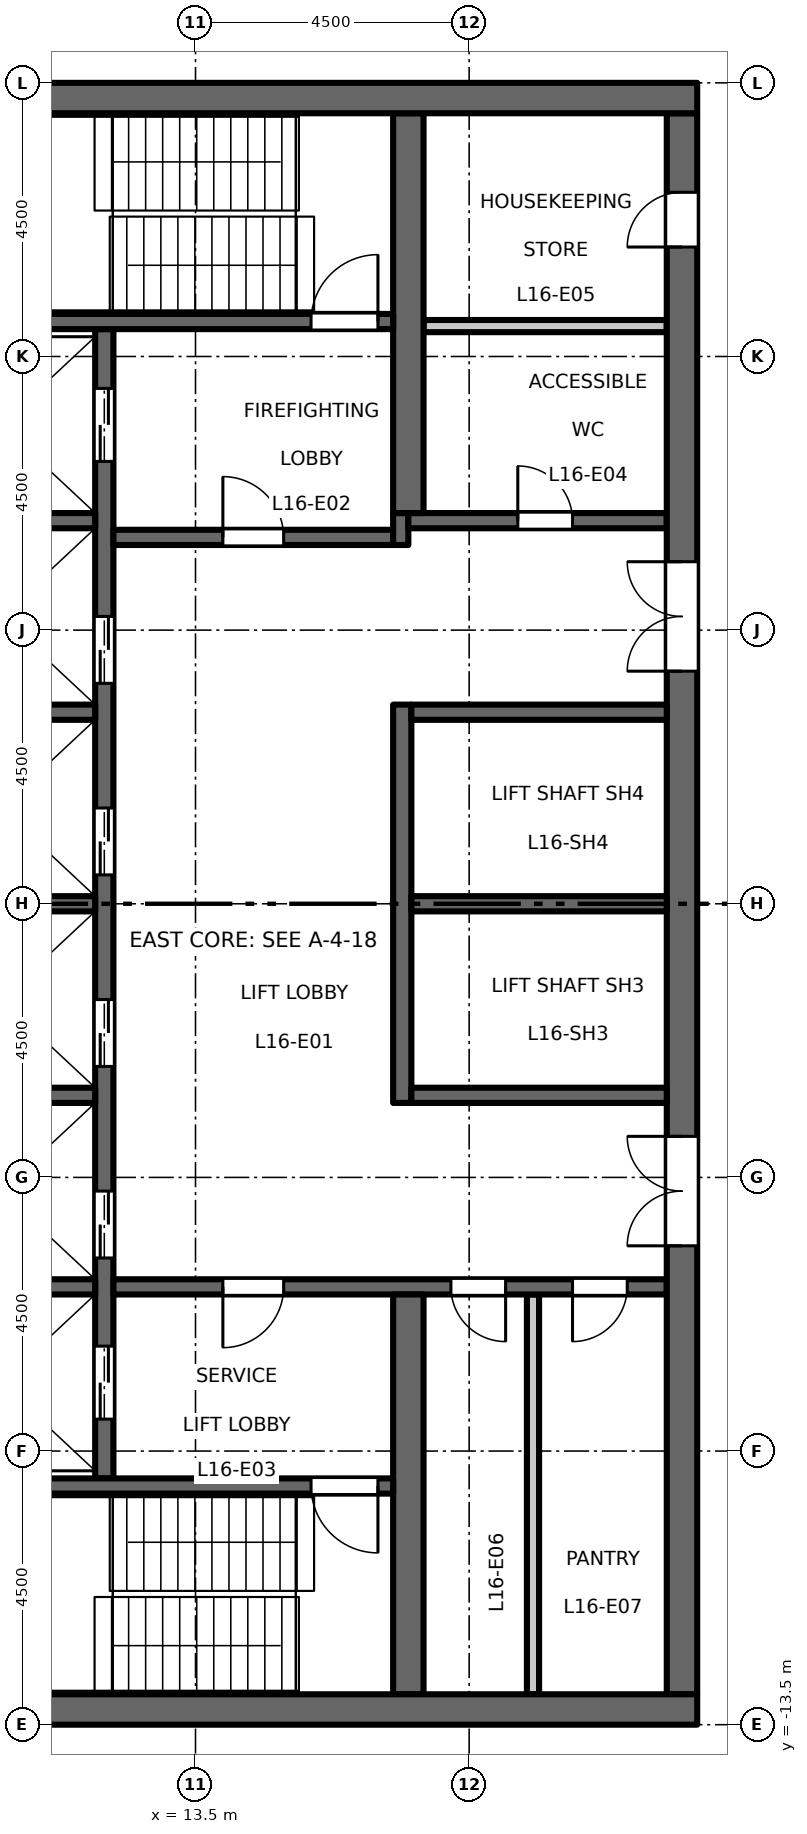
"""IFC4 building model, lengths in metres.
Left out: names, types, materials, properties, quantities, classifications, styles, units other than length and angle.
Written with IfcOpenShell. Run it as: python <this file> out.ifc"""

import sys

from ifc_helpers import new_model, si_unit, direction, frame, frame_2d, origin, place, context, subcontext, project, spatial, rectangle, extrude, element, fill, save


model = new_model("IFC4")
c1 = context("Model", 3, precision=1e-05, world=origin(), true_north=direction((0.0, 1.0)))
c2 = subcontext(c1, "Body", "Model", "MODEL_VIEW")
j1 = project(units=[si_unit("LENGTHUNIT", "METRE"), si_unit("PLANEANGLEUNIT", "RADIAN")], contexts=[c1])
p1 = place(None, origin())
s1 = spatial("IfcSite", under=j1, at=p1, CompositionType="ELEMENT")
p2 = place(p1, origin())
s2 = spatial("IfcBuilding", under=s1, at=p2, CompositionType="ELEMENT")
p3 = place(p2, frame((0.0, 0.0, 76.2)))
s3 = spatial("IfcBuildingStorey", under=s2, at=p3, CompositionType="ELEMENT", Elevation=76.2)
p4 = place(p3, frame((12.0, -9.45, 0.0), z_axis=(0.0, 0.0, 1.0), x_axis=(0.0, 1.0, 0.0)))
e1 = element("IfcWall", 1, at=p4, inside=s3, PredefinedType="SHEAR", context=c2, shape_type="SweptSolid", body=[
    extrude(rectangle(XDim=18.9, YDim=0.3, at=frame_2d((9.45, 0.0))), origin(), (0.0, 0.0, 1.0), 4.35),
])
p5 = place(p4, frame((3.625, 0.0, 0.0)))
e2 = element("IfcOpeningElement", 2, at=p5, cuts=e1, PredefinedType="OPENING", context=c2, shape_type="SweptSolid", body=[
    extrude(rectangle(XDim=1.1, YDim=2.1, at=frame_2d((0.55, 1.05))), frame((0.0, 0.16, 0.0), z_axis=(0.0, -1.0, 0.0), x_axis=(1.0, 0.0, 0.0)), (0.0, 0.0, 1.0), 0.32),
])
p6 = place(p4, frame((6.775, 0.0, 0.0)))
e3 = element("IfcOpeningElement", 3, at=p6, cuts=e1, PredefinedType="OPENING", context=c2, shape_type="SweptSolid", body=[
    extrude(rectangle(XDim=1.1, YDim=2.1, at=frame_2d((0.55, 1.05))), frame((0.0, 0.16, 0.0), z_axis=(0.0, -1.0, 0.0), x_axis=(1.0, 0.0, 0.0)), (0.0, 0.0, 1.0), 0.32),
])
p7 = place(p4, frame((9.925, 0.0, 0.0)))
e4 = element("IfcOpeningElement", 4, at=p7, cuts=e1, PredefinedType="OPENING", context=c2, shape_type="SweptSolid", body=[
    extrude(rectangle(XDim=1.1, YDim=2.1, at=frame_2d((0.55, 1.05))), frame((0.0, 0.16, 0.0), z_axis=(0.0, -1.0, 0.0), x_axis=(1.0, 0.0, 0.0)), (0.0, 0.0, 1.0), 0.32),
])
p8 = place(p4, frame((13.075, 0.0, 0.0)))
e5 = element("IfcOpeningElement", 5, at=p8, cuts=e1, PredefinedType="OPENING", context=c2, shape_type="SweptSolid", body=[
    extrude(rectangle(XDim=1.1, YDim=2.1, at=frame_2d((0.55, 1.05))), frame((0.0, 0.16, 0.0), z_axis=(0.0, -1.0, 0.0), x_axis=(1.0, 0.0, 0.0)), (0.0, 0.0, 1.0), 0.32),
])
p9 = place(p4, frame((16.725, 0.0, 0.0)))
e6 = element("IfcOpeningElement", 6, at=p9, cuts=e1, PredefinedType="OPENING", context=c2, shape_type="SweptSolid", body=[
    extrude(rectangle(XDim=1.2, YDim=2.1, at=frame_2d((0.6, 1.05))), frame((0.0, 0.16, 0.0), z_axis=(0.0, -1.0, 0.0), x_axis=(1.0, 0.0, 0.0)), (0.0, 0.0, 1.0), 0.32),
])
p10 = place(p4, frame((0.975, 0.0, 0.0)))
e7 = element("IfcOpeningElement", 7, at=p10, cuts=e1, PredefinedType="OPENING", context=c2, shape_type="SweptSolid", body=[
    extrude(rectangle(XDim=1.2, YDim=2.1, at=frame_2d((0.6, 1.05))), frame((0.0, 0.16, 0.0), z_axis=(0.0, -1.0, 0.0), x_axis=(1.0, 0.0, 0.0)), (0.0, 0.0, 1.0), 0.32),
])
p11 = place(p3, frame((12.15, 6.025, 0.0), z_axis=(0.0, 0.0, 1.0), x_axis=(1.0, 0.0, 0.0)))
e8 = element("IfcWall", 8, at=p11, inside=s3, PredefinedType="SHEAR", context=c2, shape_type="SweptSolid", body=[
    extrude(rectangle(XDim=4.6, YDim=0.25, at=frame_2d((2.3, 0.0))), origin(), (0.0, 0.0, 1.0), 4.35),
])
p12 = place(p11, frame((1.8, 0.0, 0.0)))
e9 = element("IfcOpeningElement", 9, at=p12, cuts=e8, PredefinedType="OPENING", context=c2, shape_type="SweptSolid", body=[
    extrude(rectangle(XDim=1.0, YDim=2.1, at=frame_2d((0.5, 1.05))), frame((0.0, 0.135, 0.0), z_axis=(0.0, -1.0, 0.0), x_axis=(1.0, 0.0, 0.0)), (0.0, 0.0, 1.0), 0.27),
])
p13 = place(p3, frame((16.875, 5.9, 0.0), z_axis=(0.0, 0.0, 1.0), x_axis=(0.0, 1.0, 0.0)))
e10 = element("IfcWall", 10, at=p13, inside=s3, PredefinedType="SHEAR", context=c2, shape_type="SweptSolid", body=[
    extrude(rectangle(XDim=0.525, YDim=0.25, at=frame_2d((0.263, 0.0))), origin(), (0.0, 0.0, 1.0), 4.35),
])
p14 = place(p3, frame((17.0, 6.3, 0.0), z_axis=(0.0, 0.0, 1.0), x_axis=(1.0, 0.0, 0.0)))
e11 = element("IfcWall", 11, at=p14, inside=s3, PredefinedType="SHEAR", context=c2, shape_type="SweptSolid", body=[
    extrude(rectangle(XDim=4.25, YDim=0.25, at=frame_2d((2.125, 0.0))), origin(), (0.0, 0.0, 1.0), 4.35),
])
p15 = place(p14, frame((1.8, 0.0, 0.0)))
e12 = element("IfcOpeningElement", 12, at=p15, cuts=e11, PredefinedType="OPENING", context=c2, shape_type="SweptSolid", body=[
    extrude(rectangle(XDim=0.9, YDim=2.1, at=frame_2d((0.45, 1.05))), frame((0.0, 0.135, 0.0), z_axis=(0.0, -1.0, 0.0), x_axis=(1.0, 0.0, 0.0)), (0.0, 0.0, 1.0), 0.27),
])
p16 = place(p3, frame((12.15, -6.3, 0.0), z_axis=(0.0, 0.0, 1.0), x_axis=(1.0, 0.0, 0.0)))
e13 = element("IfcWall", 13, at=p16, inside=s3, PredefinedType="SHEAR", context=c2, shape_type="SweptSolid", body=[
    extrude(rectangle(XDim=9.1, YDim=0.25, at=frame_2d((4.55, 0.0))), origin(), (0.0, 0.0, 1.0), 4.35),
])
p17 = place(p16, frame((1.8, 0.0, 0.0)))
e14 = element("IfcOpeningElement", 14, at=p17, cuts=e13, PredefinedType="OPENING", context=c2, shape_type="SweptSolid", body=[
    extrude(rectangle(XDim=1.0, YDim=2.1, at=frame_2d((0.5, 1.05))), frame((0.0, 0.135, 0.0), z_axis=(0.0, -1.0, 0.0), x_axis=(1.0, 0.0, 0.0)), (0.0, 0.0, 1.0), 0.27),
])
p18 = place(p16, frame((5.55, 0.0, 0.0)))
e15 = element("IfcOpeningElement", 15, at=p18, cuts=e13, PredefinedType="OPENING", context=c2, shape_type="SweptSolid", body=[
    extrude(rectangle(XDim=0.9, YDim=2.1, at=frame_2d((0.45, 1.05))), frame((0.0, 0.135, 0.0), z_axis=(0.0, -1.0, 0.0), x_axis=(1.0, 0.0, 0.0)), (0.0, 0.0, 1.0), 0.27),
])
p19 = place(p16, frame((7.55, 0.0, 0.0)))
e16 = element("IfcOpeningElement", 16, at=p19, cuts=e13, PredefinedType="OPENING", context=c2, shape_type="SweptSolid", body=[
    extrude(rectangle(XDim=0.9, YDim=2.1, at=frame_2d((0.45, 1.05))), frame((0.0, 0.135, 0.0), z_axis=(0.0, -1.0, 0.0), x_axis=(1.0, 0.0, 0.0)), (0.0, 0.0, 1.0), 0.27),
])
p20 = place(p3, frame((21.5, -13.0, 0.0), z_axis=(0.0, 0.0, 1.0), x_axis=(0.0, 1.0, 0.0)))
e17 = element("IfcWall", 17, at=p20, inside=s3, PredefinedType="SHEAR", context=c2, shape_type="SweptSolid", body=[
    extrude(rectangle(XDim=26.0, YDim=0.5, at=frame_2d((13.0, 0.0))), origin(), (0.0, 0.0, 1.0), 4.35),
])
p21 = place(p20, frame((16.825, 0.0, 0.0)))
e18 = element("IfcOpeningElement", 18, at=p21, cuts=e17, PredefinedType="OPENING", context=c2, shape_type="SweptSolid", body=[
    extrude(rectangle(XDim=1.8, YDim=2.1, at=frame_2d((0.9, 1.05))), frame((0.0, 0.26, 0.0), z_axis=(0.0, -1.0, 0.0), x_axis=(1.0, 0.0, 0.0)), (0.0, 0.0, 1.0), 0.52),
])
p22 = place(p20, frame((7.375, 0.0, 0.0)))
e19 = element("IfcOpeningElement", 19, at=p22, cuts=e17, PredefinedType="OPENING", context=c2, shape_type="SweptSolid", body=[
    extrude(rectangle(XDim=1.8, YDim=2.1, at=frame_2d((0.9, 1.05))), frame((0.0, 0.26, 0.0), z_axis=(0.0, -1.0, 0.0), x_axis=(1.0, 0.0, 0.0)), (0.0, 0.0, 1.0), 0.52),
])
p23 = place(p20, frame((23.8, 0.0, 0.0)))
e20 = element("IfcOpeningElement", 20, at=p23, cuts=e17, PredefinedType="OPENING", context=c2, shape_type="SweptSolid", body=[
    extrude(rectangle(XDim=0.9, YDim=2.1, at=frame_2d((0.45, 1.05))), frame((0.0, 0.26, 0.0), z_axis=(0.0, -1.0, 0.0), x_axis=(1.0, 0.0, 0.0)), (0.0, 0.0, 1.0), 0.52),
])
p24 = place(p3, frame((17.25, 9.5, 0.0), z_axis=(0.0, 0.0, 1.0), x_axis=(1.0, 0.0, 0.0)))
e21 = element("IfcWall", 21, at=p24, inside=s3, PredefinedType="PARTITIONING", context=c2, shape_type="SweptSolid", body=[
    extrude(rectangle(XDim=4.0, YDim=0.2, at=frame_2d((2.0, 0.0))), origin(), (0.0, 0.0, 1.0), 4.35),
])
p25 = place(p3, frame((19.05, -13.0, 0.0), z_axis=(0.0, 0.0, 1.0), x_axis=(0.0, 1.0, 0.0)))
e22 = element("IfcWall", 22, at=p25, inside=s3, PredefinedType="PARTITIONING", context=c2, shape_type="SweptSolid", body=[
    extrude(rectangle(XDim=6.575, YDim=0.2, at=frame_2d((3.288, 0.0))), origin(), (0.0, 0.0, 1.0), 4.35),
])
p26 = place(p3, frame((16.9, -3.275, 0.0), z_axis=(0.0, 0.0, 1.0), x_axis=(0.0, 1.0, 0.0)))
e23 = element("IfcWall", 23, at=p26, inside=s3, PredefinedType="SHEAR", context=c2, shape_type="SweptSolid", body=[
    extrude(rectangle(XDim=6.55, YDim=0.3, at=frame_2d((3.275, 0.0))), origin(), (0.0, 0.0, 1.0), 4.35),
])
for number, where, z_axis, x_axis in (
    (24, (17.05, 0.0, 0.0), (0.0, 0.0, 1.0), (1.0, 0.0, 0.0)),
    (25, (17.05, 3.15, 0.0), (0.0, 0.0, 1.0), (1.0, 0.0, 0.0)),
    (26, (17.05, -3.15, 0.0), (0.0, 0.0, 1.0), (1.0, 0.0, 0.0)),
):
    element("IfcWall", number, at=place(p3, frame(where, z_axis=z_axis, x_axis=x_axis)), inside=s3, PredefinedType="SHEAR", context=c2, shape_type="SweptSolid", body=[
        extrude(rectangle(XDim=4.2, YDim=0.25, at=frame_2d((2.1, 0.0))), origin(), (0.0, 0.0, 1.0), 4.35),
    ])
for number, where, z_axis, x_axis in (
    (27, (17.0, 6.425, 0.0), (0.0, 0.0, 1.0), (0.0, 1.0, 0.0)),
    (28, (17.0, -13.0, 0.0), (0.0, 0.0, 1.0), (0.0, 1.0, 0.0)),
):
    element("IfcWall", number, at=place(p3, frame(where, z_axis=z_axis, x_axis=x_axis)), inside=s3, PredefinedType="SHEAR", context=c2, shape_type="SweptSolid", body=[
        extrude(rectangle(XDim=6.575, YDim=0.5, at=frame_2d((3.288, 0.0))), origin(), (0.0, 0.0, 1.0), 4.35),
    ])
for number, where, z_axis, x_axis in (
    (29, (8.75, 0.0, 0.0), (0.0, 0.0, 1.0), (1.0, 0.0, 0.0)),
    (30, (8.75, 3.15, 0.0), (0.0, 0.0, 1.0), (1.0, 0.0, 0.0)),
    (31, (8.75, 6.3, 0.0), (0.0, 0.0, 1.0), (1.0, 0.0, 0.0)),
    (32, (8.75, -3.15, 0.0), (0.0, 0.0, 1.0), (1.0, 0.0, 0.0)),
    (33, (8.75, -6.3, 0.0), (0.0, 0.0, 1.0), (1.0, 0.0, 0.0)),
):
    element("IfcWall", number, at=place(p3, frame(where, z_axis=z_axis, x_axis=x_axis)), inside=s3, PredefinedType="SHEAR", context=c2, shape_type="SweptSolid", body=[
        extrude(rectangle(XDim=3.1, YDim=0.25, at=frame_2d((1.55, 0.0))), origin(), (0.0, 0.0, 1.0), 4.35),
    ])
p27 = place(p3, frame((8.75, 9.575, 0.0), z_axis=(0.0, 0.0, 1.0), x_axis=(1.0, 0.0, 0.0)))
e34 = element("IfcWall", 34, at=p27, inside=s3, PredefinedType="SHEAR", context=c2, shape_type="SweptSolid", body=[
    extrude(rectangle(XDim=8.0, YDim=0.25, at=frame_2d((4.0, 0.0))), origin(), (0.0, 0.0, 1.0), 4.35),
])
p28 = place(p27, frame((6.65, 0.0, 0.0)))
e35 = element("IfcOpeningElement", 35, at=p28, cuts=e34, PredefinedType="OPENING", context=c2, shape_type="SweptSolid", body=[
    extrude(rectangle(XDim=1.1, YDim=2.1, at=frame_2d((0.55, 1.05))), frame((0.0, 0.135, 0.0), z_axis=(0.0, -1.0, 0.0), x_axis=(1.0, 0.0, 0.0)), (0.0, 0.0, 1.0), 0.27),
])
p29 = place(p3, frame((8.75, -9.575, 0.0), z_axis=(0.0, 0.0, 1.0), x_axis=(1.0, 0.0, 0.0)))
e36 = element("IfcWall", 36, at=p29, inside=s3, PredefinedType="SHEAR", context=c2, shape_type="SweptSolid", body=[
    extrude(rectangle(XDim=8.0, YDim=0.25, at=frame_2d((4.0, 0.0))), origin(), (0.0, 0.0, 1.0), 4.35),
])
p30 = place(p29, frame((6.65, 0.0, 0.0)))
e37 = element("IfcOpeningElement", 37, at=p30, cuts=e36, PredefinedType="OPENING", context=c2, shape_type="SweptSolid", body=[
    extrude(rectangle(XDim=1.1, YDim=2.1, at=frame_2d((0.55, 1.05))), frame((0.0, 0.135, 0.0), z_axis=(0.0, -1.0, 0.0), x_axis=(1.0, 0.0, 0.0)), (0.0, 0.0, 1.0), 0.27),
])
for number, where, z_axis, x_axis in (
    (38, (8.25, 13.25, 0.0), (0.0, 0.0, 1.0), (1.0, 0.0, 0.0)),
    (39, (8.25, -13.25, 0.0), (0.0, 0.0, 1.0), (1.0, 0.0, 0.0)),
):
    element("IfcWall", number, at=place(p3, frame(where, z_axis=z_axis, x_axis=x_axis)), inside=s3, PredefinedType="SHEAR", context=c2, shape_type="SweptSolid", body=[
        extrude(rectangle(XDim=13.5, YDim=0.5, at=frame_2d((6.75, 0.0))), origin(), (0.0, 0.0, 1.0), 4.35),
    ])
p31 = place(p12, origin())
e40 = element("IfcDoor", 40, at=p31, inside=s3, OperationType="SINGLE_SWING_RIGHT", PredefinedType="DOOR", context=c2, shape_type="SweptSolid", body=[
    extrude(rectangle(XDim=1.0, YDim=2.1, at=frame_2d((0.5, 1.05))), frame((0.0, 0.025, 0.0), z_axis=(0.0, -1.0, 0.0), x_axis=(1.0, 0.0, 0.0)), (0.0, 0.0, 1.0), 0.05),
])
fill(e9, e40)
p32 = place(p17, origin())
e41 = element("IfcDoor", 41, at=p32, inside=s3, OperationType="SINGLE_SWING_LEFT", PredefinedType="DOOR", context=c2, shape_type="SweptSolid", body=[
    extrude(rectangle(XDim=1.0, YDim=2.1, at=frame_2d((0.5, 1.05))), frame((0.0, 0.025, 0.0), z_axis=(0.0, -1.0, 0.0), x_axis=(1.0, 0.0, 0.0)), (0.0, 0.0, 1.0), 0.05),
])
fill(e14, e41)
p33 = place(p28, origin())
e42 = element("IfcDoor", 42, at=p33, inside=s3, OperationType="SINGLE_SWING_LEFT", PredefinedType="DOOR", context=c2, shape_type="SweptSolid", body=[
    extrude(rectangle(XDim=1.1, YDim=2.1, at=frame_2d((0.55, 1.05))), frame((0.0, 0.025, 0.0), z_axis=(0.0, -1.0, 0.0), x_axis=(1.0, 0.0, 0.0)), (0.0, 0.0, 1.0), 0.05),
])
fill(e35, e42)
p34 = place(p30, origin())
e43 = element("IfcDoor", 43, at=p34, inside=s3, OperationType="SINGLE_SWING_RIGHT", PredefinedType="DOOR", context=c2, shape_type="SweptSolid", body=[
    extrude(rectangle(XDim=1.1, YDim=2.1, at=frame_2d((0.55, 1.05))), frame((0.0, 0.025, 0.0), z_axis=(0.0, -1.0, 0.0), x_axis=(1.0, 0.0, 0.0)), (0.0, 0.0, 1.0), 0.05),
])
fill(e37, e43)
p35 = place(p21, origin())
e44 = element("IfcDoor", 44, at=p35, inside=s3, OperationType="DOUBLE_DOOR_DOUBLE_SWING", PredefinedType="DOOR", context=c2, shape_type="SweptSolid", body=[
    extrude(rectangle(XDim=1.8, YDim=2.1, at=frame_2d((0.9, 1.05))), frame((0.0, 0.025, 0.0), z_axis=(0.0, -1.0, 0.0), x_axis=(1.0, 0.0, 0.0)), (0.0, 0.0, 1.0), 0.05),
])
fill(e18, e44)
p36 = place(p22, origin())
e45 = element("IfcDoor", 45, at=p36, inside=s3, OperationType="DOUBLE_DOOR_DOUBLE_SWING", PredefinedType="DOOR", context=c2, shape_type="SweptSolid", body=[
    extrude(rectangle(XDim=1.8, YDim=2.1, at=frame_2d((0.9, 1.05))), frame((0.0, 0.025, 0.0), z_axis=(0.0, -1.0, 0.0), x_axis=(1.0, 0.0, 0.0)), (0.0, 0.0, 1.0), 0.05),
])
fill(e19, e45)
p37 = place(p5, origin())
e46 = element("IfcDoor", 46, at=p37, inside=s3, OperationType="DOUBLE_DOOR_SLIDING", PredefinedType="DOOR", context=c2, shape_type="SweptSolid", body=[
    extrude(rectangle(XDim=1.1, YDim=2.1, at=frame_2d((0.55, 1.05))), frame((0.0, 0.025, 0.0), z_axis=(0.0, -1.0, 0.0), x_axis=(1.0, 0.0, 0.0)), (0.0, 0.0, 1.0), 0.05),
])
fill(e2, e46)
p38 = place(p6, origin())
e47 = element("IfcDoor", 47, at=p38, inside=s3, OperationType="DOUBLE_DOOR_SLIDING", PredefinedType="DOOR", context=c2, shape_type="SweptSolid", body=[
    extrude(rectangle(XDim=1.1, YDim=2.1, at=frame_2d((0.55, 1.05))), frame((0.0, 0.025, 0.0), z_axis=(0.0, -1.0, 0.0), x_axis=(1.0, 0.0, 0.0)), (0.0, 0.0, 1.0), 0.05),
])
fill(e3, e47)
p39 = place(p7, origin())
e48 = element("IfcDoor", 48, at=p39, inside=s3, OperationType="DOUBLE_DOOR_SLIDING", PredefinedType="DOOR", context=c2, shape_type="SweptSolid", body=[
    extrude(rectangle(XDim=1.1, YDim=2.1, at=frame_2d((0.55, 1.05))), frame((0.0, 0.025, 0.0), z_axis=(0.0, -1.0, 0.0), x_axis=(1.0, 0.0, 0.0)), (0.0, 0.0, 1.0), 0.05),
])
fill(e4, e48)
p40 = place(p8, origin())
e49 = element("IfcDoor", 49, at=p40, inside=s3, OperationType="DOUBLE_DOOR_SLIDING", PredefinedType="DOOR", context=c2, shape_type="SweptSolid", body=[
    extrude(rectangle(XDim=1.1, YDim=2.1, at=frame_2d((0.55, 1.05))), frame((0.0, 0.025, 0.0), z_axis=(0.0, -1.0, 0.0), x_axis=(1.0, 0.0, 0.0)), (0.0, 0.0, 1.0), 0.05),
])
fill(e5, e49)
p41 = place(p9, origin())
e50 = element("IfcDoor", 50, at=p41, inside=s3, OperationType="DOUBLE_DOOR_SLIDING", PredefinedType="DOOR", context=c2, shape_type="SweptSolid", body=[
    extrude(rectangle(XDim=1.2, YDim=2.1, at=frame_2d((0.6, 1.05))), frame((0.0, 0.025, 0.0), z_axis=(0.0, -1.0, 0.0), x_axis=(1.0, 0.0, 0.0)), (0.0, 0.0, 1.0), 0.05),
])
fill(e6, e50)
p42 = place(p10, origin())
e51 = element("IfcDoor", 51, at=p42, inside=s3, OperationType="DOUBLE_DOOR_SLIDING", PredefinedType="DOOR", context=c2, shape_type="SweptSolid", body=[
    extrude(rectangle(XDim=1.2, YDim=2.1, at=frame_2d((0.6, 1.05))), frame((0.0, 0.025, 0.0), z_axis=(0.0, -1.0, 0.0), x_axis=(1.0, 0.0, 0.0)), (0.0, 0.0, 1.0), 0.05),
])
fill(e7, e51)
p43 = place(p15, origin())
e52 = element("IfcDoor", 52, at=p43, inside=s3, OperationType="SINGLE_SWING_RIGHT", PredefinedType="DOOR", context=c2, shape_type="SweptSolid", body=[
    extrude(rectangle(XDim=0.9, YDim=2.1, at=frame_2d((0.45, 1.05))), frame((0.0, 0.025, 0.0), z_axis=(0.0, -1.0, 0.0), x_axis=(1.0, 0.0, 0.0)), (0.0, 0.0, 1.0), 0.05),
])
fill(e12, e52)
p44 = place(p23, origin())
e53 = element("IfcDoor", 53, at=p44, inside=s3, OperationType="SINGLE_SWING_RIGHT", PredefinedType="DOOR", context=c2, shape_type="SweptSolid", body=[
    extrude(rectangle(XDim=0.9, YDim=2.1, at=frame_2d((0.45, 1.05))), frame((0.0, 0.025, 0.0), z_axis=(0.0, -1.0, 0.0), x_axis=(1.0, 0.0, 0.0)), (0.0, 0.0, 1.0), 0.05),
])
fill(e20, e53)
p45 = place(p18, origin())
e54 = element("IfcDoor", 54, at=p45, inside=s3, OperationType="SINGLE_SWING_RIGHT", PredefinedType="DOOR", context=c2, shape_type="SweptSolid", body=[
    extrude(rectangle(XDim=0.9, YDim=2.1, at=frame_2d((0.45, 1.05))), frame((0.0, 0.025, 0.0), z_axis=(0.0, -1.0, 0.0), x_axis=(1.0, 0.0, 0.0)), (0.0, 0.0, 1.0), 0.05),
])
fill(e15, e54)
p46 = place(p19, origin())
e55 = element("IfcDoor", 55, at=p46, inside=s3, OperationType="SINGLE_SWING_LEFT", PredefinedType="DOOR", context=c2, shape_type="SweptSolid", body=[
    extrude(rectangle(XDim=0.9, YDim=2.1, at=frame_2d((0.45, 1.05))), frame((0.0, 0.025, 0.0), z_axis=(0.0, -1.0, 0.0), x_axis=(1.0, 0.0, 0.0)), (0.0, 0.0, 1.0), 0.05),
])
fill(e16, e55)
save(model, sys.argv[1])
